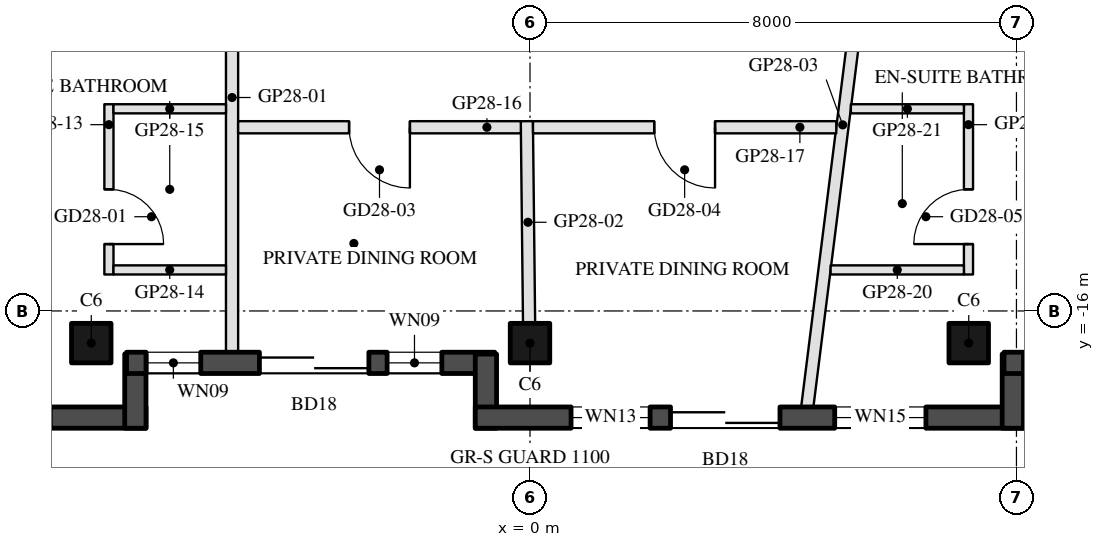
"""IFC4 building model, lengths in metres.
Left out: names, types, materials, properties, quantities, classifications, styles, units other than length and angle.
Written with IfcOpenShell. Run it as: python <this file> out.ifc"""

import sys

from ifc_helpers import new_model, si_unit, direction, frame, frame_2d, origin, origin_2d, place, context, subcontext, project, spatial, rectangle, hollow_rectangle, extrude, boolean, halfspace, element, fill, save


model = new_model("IFC4")
c1 = context("Model", 3, precision=1e-05, world=origin(), true_north=direction((0.0, 1.0)))
c2 = subcontext(c1, "Body", "Model", "MODEL_VIEW")
j1 = project(units=[si_unit("LENGTHUNIT", "METRE"), si_unit("PLANEANGLEUNIT", "RADIAN")], contexts=[c1])
p1 = place(None, origin())
s1 = spatial("IfcSite", under=j1, at=p1, CompositionType="ELEMENT")
p2 = place(p1, origin())
s2 = spatial("IfcBuilding", under=s1, at=p2, CompositionType="ELEMENT")
p3 = place(p2, frame((0.0, 0.0, 283.7)))
s3 = spatial("IfcBuildingStorey", under=s2, at=p3, CompositionType="ELEMENT", Elevation=283.7)
p4 = place(p3, frame((-7.215, -16.529, 0.0), z_axis=(0.0, 0.0, 1.0), x_axis=(-1.0, 0.0, 0.0)))
e1 = element("IfcColumn", 1, at=p4, inside=s3, PredefinedType="COLUMN", context=c2, shape_type="SweptSolid", body=[
    boolean("DIFFERENCE", extrude(hollow_rectangle(XDim=0.65, YDim=0.65, WallThickness=0.03, at=origin_2d()), origin(), (0.0, 0.0, 1.0), 3.7), halfspace(frame((0.0, 0.0, 3.66), z_axis=(0.0, 0.0, 1.0), x_axis=(1.0, 0.0, 0.0)), False)),
])
p5 = place(p3, frame((0.0, -16.529, 0.0), z_axis=(0.0, 0.0, 1.0), x_axis=(-1.0, 0.0, 0.0)))
e2 = element("IfcColumn", 2, at=p5, inside=s3, PredefinedType="COLUMN", context=c2, shape_type="SweptSolid", body=[
    boolean("DIFFERENCE", extrude(hollow_rectangle(XDim=0.65, YDim=0.65, WallThickness=0.03, at=origin_2d()), origin(), (0.0, 0.0, 1.0), 3.7), halfspace(frame((0.0, 0.0, 3.663), z_axis=(0.0, 0.0, 1.0), x_axis=(1.0, 0.0, 0.0)), False)),
])
p6 = place(p3, frame((7.215, -16.529, 0.0), z_axis=(0.0, 0.0, 1.0), x_axis=(-1.0, 0.0, 0.0)))
e3 = element("IfcColumn", 3, at=p6, inside=s3, PredefinedType="COLUMN", context=c2, shape_type="SweptSolid", body=[
    boolean("DIFFERENCE", extrude(hollow_rectangle(XDim=0.65, YDim=0.65, WallThickness=0.03, at=origin_2d()), origin(), (0.0, 0.0, 1.0), 3.7), halfspace(frame((0.0, 0.0, 3.66), z_axis=(0.0, 0.0, 1.0), x_axis=(1.0, 0.0, 0.0)), False)),
])
p7 = place(p3, frame((-17.185, -17.754, 0.0), z_axis=(0.0, 0.0, 1.0), x_axis=(1.0, 0.0, 0.0)))
e4 = element("IfcWall", 4, at=p7, inside=s3, PredefinedType="SOLIDWALL", context=c2, shape_type="SweptSolid", body=[
    extrude(rectangle(XDim=10.87, YDim=0.35, at=frame_2d((5.435, 0.0))), origin(), (0.0, 0.0, 1.0), 3.55),
])
p8 = place(p7, frame((0.381, 0.0, 0.3)))
e5 = element("IfcOpeningElement", 5, at=p8, cuts=e4, PredefinedType="OPENING", context=c2, shape_type="SweptSolid", body=[
    extrude(rectangle(XDim=1.6, YDim=2.65, at=frame_2d((0.8, 1.325))), frame((0.0, 0.185, 0.0), z_axis=(0.0, -1.0, 0.0), x_axis=(1.0, 0.0, 0.0)), (0.0, 0.0, 1.0), 0.37),
])
p9 = place(p7, frame((6.895, 0.0, 0.0)))
e6 = element("IfcOpeningElement", 6, at=p9, cuts=e4, PredefinedType="OPENING", context=c2, shape_type="SweptSolid", body=[
    extrude(rectangle(XDim=2.4, YDim=2.4, at=frame_2d((1.2, 1.2))), frame((0.0, 0.185, 0.0), z_axis=(0.0, -1.0, 0.0), x_axis=(1.0, 0.0, 0.0)), (0.0, 0.0, 1.0), 0.37),
])
p10 = place(p7, frame((3.43, 0.0, 0.3)))
e7 = element("IfcOpeningElement", 7, at=p10, cuts=e4, PredefinedType="OPENING", context=c2, shape_type="SweptSolid", body=[
    extrude(rectangle(XDim=3.1, YDim=2.65, at=frame_2d((1.55, 1.325))), frame((0.0, 0.185, 0.0), z_axis=(0.0, -1.0, 0.0), x_axis=(1.0, 0.0, 0.0)), (0.0, 0.0, 1.0), 0.37),
])
p11 = place(p3, frame((-6.49, -17.929, 0.0), z_axis=(0.0, 0.0, 1.0), x_axis=(0.0, 1.0, 0.0)))
e8 = element("IfcWall", 8, at=p11, inside=s3, PredefinedType="SOLIDWALL", context=c2, shape_type="SweptSolid", body=[
    extrude(rectangle(XDim=1.22, YDim=0.35, at=frame_2d((0.61, 0.0))), origin(), (0.0, 0.0, 1.0), 3.55),
])
p12 = place(p3, frame((-6.635, -16.854, 0.0), z_axis=(0.0, 0.0, 1.0), x_axis=(1.0, 0.0, 0.0)))
e9 = element("IfcWall", 9, at=p12, inside=s3, PredefinedType="SOLIDWALL", context=c2, shape_type="SweptSolid", body=[
    extrude(rectangle(XDim=6.055, YDim=0.35, at=frame_2d((3.028, 0.0))), origin(), (0.0, 0.0, 1.0), 3.55),
])
p13 = place(p12, frame((0.32, 0.0, 0.3)))
e10 = element("IfcOpeningElement", 10, at=p13, cuts=e9, PredefinedType="OPENING", context=c2, shape_type="SweptSolid", body=[
    extrude(rectangle(XDim=0.9, YDim=2.65, at=frame_2d((0.45, 1.325))), frame((0.0, 0.185, 0.0), z_axis=(0.0, -1.0, 0.0), x_axis=(1.0, 0.0, 0.0)), (0.0, 0.0, 1.0), 0.37),
])
p14 = place(p12, frame((2.186, 0.0, 0.0)))
e11 = element("IfcOpeningElement", 11, at=p14, cuts=e9, PredefinedType="OPENING", context=c2, shape_type="SweptSolid", body=[
    extrude(rectangle(XDim=1.8, YDim=2.4, at=frame_2d((0.9, 1.2))), frame((0.0, 0.185, 0.0), z_axis=(0.0, -1.0, 0.0), x_axis=(1.0, 0.0, 0.0)), (0.0, 0.0, 1.0), 0.37),
])
p15 = place(p12, frame((4.285, 0.0, 0.3)))
e12 = element("IfcOpeningElement", 12, at=p15, cuts=e9, PredefinedType="OPENING", context=c2, shape_type="SweptSolid", body=[
    extrude(rectangle(XDim=0.9, YDim=2.65, at=frame_2d((0.45, 1.325))), frame((0.0, 0.185, 0.0), z_axis=(0.0, -1.0, 0.0), x_axis=(1.0, 0.0, 0.0)), (0.0, 0.0, 1.0), 0.37),
])
p16 = place(p3, frame((-0.725, -16.709, 0.0), z_axis=(0.0, 0.0, 1.0), x_axis=(0.0, -1.0, 0.0)))
e13 = element("IfcWall", 13, at=p16, inside=s3, PredefinedType="SOLIDWALL", context=c2, shape_type="SweptSolid", body=[
    extrude(rectangle(XDim=1.22, YDim=0.35, at=frame_2d((0.61, 0.0))), origin(), (0.0, 0.0, 1.0), 3.55),
])
p17 = place(p3, frame((-0.9, -17.754, 0.0), z_axis=(0.0, 0.0, 1.0), x_axis=(1.0, 0.0, 0.0)))
e14 = element("IfcWall", 14, at=p17, inside=s3, PredefinedType="SOLIDWALL", context=c2, shape_type="SweptSolid", body=[
    extrude(rectangle(XDim=9.015, YDim=0.35, at=frame_2d((4.508, 0.0))), origin(), (0.0, 0.0, 1.0), 3.55),
])
p18 = place(p17, frame((3.211, 0.0, 0.0)))
e15 = element("IfcOpeningElement", 15, at=p18, cuts=e14, PredefinedType="OPENING", context=c2, shape_type="SweptSolid", body=[
    extrude(rectangle(XDim=1.8, YDim=2.4, at=frame_2d((0.9, 1.2))), frame((0.0, 0.185, 0.0), z_axis=(0.0, -1.0, 0.0), x_axis=(1.0, 0.0, 0.0)), (0.0, 0.0, 1.0), 0.37),
])
p19 = place(p17, frame((1.575, 0.0, 0.3)))
e16 = element("IfcOpeningElement", 16, at=p19, cuts=e14, PredefinedType="OPENING", context=c2, shape_type="SweptSolid", body=[
    extrude(rectangle(XDim=1.3, YDim=2.65, at=frame_2d((0.65, 1.325))), frame((0.0, 0.185, 0.0), z_axis=(0.0, -1.0, 0.0), x_axis=(1.0, 0.0, 0.0)), (0.0, 0.0, 1.0), 0.37),
])
p20 = place(p17, frame((5.911, 0.0, 0.3)))
e17 = element("IfcOpeningElement", 17, at=p20, cuts=e14, PredefinedType="OPENING", context=c2, shape_type="SweptSolid", body=[
    extrude(rectangle(XDim=1.5, YDim=2.65, at=frame_2d((0.75, 1.325))), frame((0.0, 0.185, 0.0), z_axis=(0.0, -1.0, 0.0), x_axis=(1.0, 0.0, 0.0)), (0.0, 0.0, 1.0), 0.37),
])
p21 = place(p3, frame((7.94, -17.929, 0.0), z_axis=(0.0, 0.0, 1.0), x_axis=(0.0, 1.0, 0.0)))
e18 = element("IfcWall", 18, at=p21, inside=s3, PredefinedType="SOLIDWALL", context=c2, shape_type="SweptSolid", body=[
    extrude(rectangle(XDim=1.22, YDim=0.35, at=frame_2d((0.61, 0.0))), origin(), (0.0, 0.0, 1.0), 3.55),
])
p22 = place(p3, frame((7.795, -16.854, 0.0), z_axis=(0.0, 0.0, 1.0), x_axis=(1.0, 0.0, 0.0)))
e19 = element("IfcWall", 19, at=p22, inside=s3, PredefinedType="SOLIDWALL", context=c2, shape_type="SweptSolid", body=[
    extrude(rectangle(XDim=6.055, YDim=0.35, at=frame_2d((3.028, 0.0))), origin(), (0.0, 0.0, 1.0), 3.55),
])
p23 = place(p22, frame((0.32, 0.0, 0.0)))
e20 = element("IfcOpeningElement", 20, at=p23, cuts=e19, PredefinedType="OPENING", context=c2, shape_type="SweptSolid", body=[
    extrude(rectangle(XDim=2.4, YDim=2.4, at=frame_2d((1.2, 1.2))), frame((0.0, 0.185, 0.0), z_axis=(0.0, -1.0, 0.0), x_axis=(1.0, 0.0, 0.0)), (0.0, 0.0, 1.0), 0.37),
])
p24 = place(p22, frame((3.02, 0.0, 0.3)))
e21 = element("IfcOpeningElement", 21, at=p24, cuts=e19, PredefinedType="OPENING", context=c2, shape_type="SweptSolid", body=[
    extrude(rectangle(XDim=2.2, YDim=2.65, at=frame_2d((1.1, 1.325))), frame((0.0, 0.185, 0.0), z_axis=(0.0, -1.0, 0.0), x_axis=(1.0, 0.0, 0.0)), (0.0, 0.0, 1.0), 0.37),
])
p25 = place(p3, frame((-4.9, -16.679, 0.0), z_axis=(0.0, 0.0, 1.0), x_axis=(0.0, 1.0, 0.0)))
e22 = element("IfcWall", 22, at=p25, inside=s3, PredefinedType="PARTITIONING", context=c2, shape_type="SweptSolid", body=[
    extrude(rectangle(XDim=8.379, YDim=0.2, at=frame_2d((4.189, 0.0))), origin(), (0.0, 0.0, 1.0), 3.1),
])
p26 = place(p3, frame((-0.015, -16.204, 0.0), z_axis=(0.0, 0.0, 1.0), x_axis=(-0.011013356537, 0.99993935115, 0.0)))
e23 = element("IfcWall", 23, at=p26, inside=s3, PredefinedType="PARTITIONING", context=c2, shape_type="SweptSolid", body=[
    extrude(rectangle(XDim=3.325, YDim=0.2, at=frame_2d((1.663, 0.0))), origin(), (0.0, 0.0, 1.0), 3.05),
])
p27 = place(p3, frame((4.56, -17.579, 0.0), z_axis=(0.0, 0.0, 1.0), x_axis=(0.124584174438, 0.992209042228, 0.0)))
e24 = element("IfcWall", 24, at=p27, inside=s3, PredefinedType="PARTITIONING", context=c2, shape_type="SweptSolid", body=[
    extrude(rectangle(XDim=9.351, YDim=0.2, at=frame_2d((4.676, 0.0))), origin(), (0.0, 0.0, 1.0), 3.1),
])
p28 = place(p3, frame((-6.925, -12.6, 0.0), z_axis=(0.0, 0.0, 1.0), x_axis=(0.0, -1.0, 0.0)))
e25 = element("IfcWall", 25, at=p28, inside=s3, PredefinedType="PARTITIONING", context=c2, shape_type="SweptSolid", body=[
    extrude(rectangle(XDim=2.8, YDim=0.15, at=frame_2d((1.4, 0.0))), origin(), (0.0, 0.0, 1.0), 3.55),
])
p29 = place(p28, frame((1.4, 0.0, 0.0)))
e26 = element("IfcOpeningElement", 26, at=p29, cuts=e25, PredefinedType="OPENING", context=c2, shape_type="SweptSolid", body=[
    extrude(rectangle(XDim=0.9, YDim=2.1, at=frame_2d((0.45, 1.05))), frame((0.0, 0.085, 0.0), z_axis=(0.0, -1.0, 0.0), x_axis=(1.0, 0.0, 0.0)), (0.0, 0.0, 1.0), 0.17),
])
for number, where, z_axis, x_axis in (
    (27, (-6.85, -15.325, 0.0), (0.0, 0.0, 1.0), (1.0, 0.0, 0.0)),
    (28, (-6.85, -12.675, 0.0), (0.0, 0.0, 1.0), (1.0, 0.0, 0.0)),
):
    element("IfcWall", number, at=place(p3, frame(where, z_axis=z_axis, x_axis=x_axis)), inside=s3, PredefinedType="PARTITIONING", context=c2, shape_type="SweptSolid", body=[
        extrude(rectangle(XDim=1.85, YDim=0.15, at=frame_2d((0.925, 0.0))), origin(), (0.0, 0.0, 1.0), 3.55),
    ])
p30 = place(p3, frame((-0.151, -12.979, 0.0), z_axis=(0.0, 0.0, 1.0), x_axis=(-1.0, 0.0, 0.0)))
e29 = element("IfcWall", 29, at=p30, inside=s3, PredefinedType="PARTITIONING", context=c2, shape_type="SweptSolid", body=[
    extrude(rectangle(XDim=4.649, YDim=0.2, at=frame_2d((2.325, 0.0))), origin(), (0.0, 0.0, 1.0), 3.05),
])
p31 = place(p30, frame((1.825, 0.0, 0.0)))
e30 = element("IfcOpeningElement", 30, at=p31, cuts=e29, PredefinedType="OPENING", context=c2, shape_type="SweptSolid", body=[
    extrude(rectangle(XDim=1.0, YDim=2.1, at=frame_2d((0.5, 1.05))), frame((0.0, 0.11, 0.0), z_axis=(0.0, -1.0, 0.0), x_axis=(1.0, 0.0, 0.0)), (0.0, 0.0, 1.0), 0.22),
])
p32 = place(p3, frame((5.037, -12.979, 0.0), z_axis=(0.0, 0.0, 1.0), x_axis=(-1.0, 0.0, 0.0)))
e31 = element("IfcWall", 31, at=p32, inside=s3, PredefinedType="PARTITIONING", context=c2, shape_type="SweptSolid", body=[
    extrude(rectangle(XDim=4.988, YDim=0.2, at=frame_2d((2.494, 0.0))), origin(), (0.0, 0.0, 1.0), 3.05),
])
p33 = place(p32, frame((1.994, 0.0, 0.0)))
e32 = element("IfcOpeningElement", 32, at=p33, cuts=e31, PredefinedType="OPENING", context=c2, shape_type="SweptSolid", body=[
    extrude(rectangle(XDim=1.0, YDim=2.1, at=frame_2d((0.5, 1.05))), frame((0.0, 0.11, 0.0), z_axis=(0.0, -1.0, 0.0), x_axis=(1.0, 0.0, 0.0)), (0.0, 0.0, 1.0), 0.22),
])
p34 = place(p3, frame((7.211, -15.4, 0.0), z_axis=(0.0, 0.0, 1.0), x_axis=(0.0, 1.0, 0.0)))
e33 = element("IfcWall", 33, at=p34, inside=s3, PredefinedType="PARTITIONING", context=c2, shape_type="SweptSolid", body=[
    extrude(rectangle(XDim=2.8, YDim=0.15, at=frame_2d((1.4, 0.0))), origin(), (0.0, 0.0, 1.0), 3.05),
])
p35 = place(p34, frame((0.5, 0.0, 0.0)))
e34 = element("IfcOpeningElement", 34, at=p35, cuts=e33, PredefinedType="OPENING", context=c2, shape_type="SweptSolid", body=[
    extrude(rectangle(XDim=0.9, YDim=2.1, at=frame_2d((0.45, 1.05))), frame((0.0, 0.085, 0.0), z_axis=(0.0, -1.0, 0.0), x_axis=(1.0, 0.0, 0.0)), (0.0, 0.0, 1.0), 0.17),
])
p36 = place(p3, frame((4.944, -15.325, 0.0), z_axis=(0.0, 0.0, 1.0), x_axis=(1.0, 0.0, 0.0)))
e35 = element("IfcWall", 35, at=p36, inside=s3, PredefinedType="PARTITIONING", context=c2, shape_type="SweptSolid", body=[
    extrude(rectangle(XDim=2.192, YDim=0.15, at=frame_2d((1.096, 0.0))), origin(), (0.0, 0.0, 1.0), 3.05),
])
p37 = place(p3, frame((5.277, -12.675, 0.0), z_axis=(0.0, 0.0, 1.0), x_axis=(1.0, 0.0, 0.0)))
e36 = element("IfcWall", 36, at=p37, inside=s3, PredefinedType="PARTITIONING", context=c2, shape_type="SweptSolid", body=[
    extrude(rectangle(XDim=1.859, YDim=0.15, at=frame_2d((0.93, 0.0))), origin(), (0.0, 0.0, 1.0), 3.05),
])
p38 = place(p13, origin())
e37 = element("IfcWindow", 37, at=p38, inside=s3, PartitioningType="SINGLE_PANEL", PredefinedType="WINDOW", context=c2, shape_type="SweptSolid", body=[
    extrude(rectangle(XDim=0.9, YDim=2.65, at=frame_2d((0.45, 1.325))), frame((0.0, 0.03, 0.0), z_axis=(0.0, -1.0, 0.0), x_axis=(1.0, 0.0, 0.0)), (0.0, 0.0, 1.0), 0.06),
])
fill(e10, e37)
p39 = place(p14, frame((1.8, 0.0, 0.0), z_axis=(0.0, 0.0, 1.0), x_axis=(-1.0, 0.0, 0.0)))
e38 = element("IfcDoor", 38, at=p39, inside=s3, OperationType="SLIDING_TO_LEFT", PredefinedType="DOOR", context=c2, shape_type="SweptSolid", body=[
    extrude(rectangle(XDim=1.8, YDim=2.4, at=frame_2d((0.9, 1.2))), frame((0.0, 0.025, 0.0), z_axis=(0.0, -1.0, 0.0), x_axis=(1.0, 0.0, 0.0)), (0.0, 0.0, 1.0), 0.05),
])
fill(e11, e38)
p40 = place(p15, origin())
e39 = element("IfcWindow", 39, at=p40, inside=s3, PartitioningType="SINGLE_PANEL", PredefinedType="WINDOW", context=c2, shape_type="SweptSolid", body=[
    extrude(rectangle(XDim=0.9, YDim=2.65, at=frame_2d((0.45, 1.325))), frame((0.0, 0.03, 0.0), z_axis=(0.0, -1.0, 0.0), x_axis=(1.0, 0.0, 0.0)), (0.0, 0.0, 1.0), 0.06),
])
fill(e12, e39)
p41 = place(p18, frame((1.8, 0.0, 0.0), z_axis=(0.0, 0.0, 1.0), x_axis=(-1.0, 0.0, 0.0)))
e40 = element("IfcDoor", 40, at=p41, inside=s3, OperationType="SLIDING_TO_LEFT", PredefinedType="DOOR", context=c2, shape_type="SweptSolid", body=[
    extrude(rectangle(XDim=1.8, YDim=2.4, at=frame_2d((0.9, 1.2))), frame((0.0, 0.025, 0.0), z_axis=(0.0, -1.0, 0.0), x_axis=(1.0, 0.0, 0.0)), (0.0, 0.0, 1.0), 0.05),
])
fill(e15, e40)
p42 = place(p19, origin())
e41 = element("IfcWindow", 41, at=p42, inside=s3, PartitioningType="SINGLE_PANEL", PredefinedType="WINDOW", context=c2, shape_type="SweptSolid", body=[
    extrude(rectangle(XDim=1.3, YDim=2.65, at=frame_2d((0.65, 1.325))), frame((0.0, 0.03, 0.0), z_axis=(0.0, -1.0, 0.0), x_axis=(1.0, 0.0, 0.0)), (0.0, 0.0, 1.0), 0.06),
])
fill(e16, e41)
p43 = place(p20, origin())
e42 = element("IfcWindow", 42, at=p43, inside=s3, PartitioningType="SINGLE_PANEL", PredefinedType="WINDOW", context=c2, shape_type="SweptSolid", body=[
    extrude(rectangle(XDim=1.5, YDim=2.65, at=frame_2d((0.75, 1.325))), frame((0.0, 0.03, 0.0), z_axis=(0.0, -1.0, 0.0), x_axis=(1.0, 0.0, 0.0)), (0.0, 0.0, 1.0), 0.06),
])
fill(e17, e42)
p44 = place(p23, frame((2.4, 0.0, 0.0), z_axis=(0.0, 0.0, 1.0), x_axis=(-1.0, 0.0, 0.0)))
e43 = element("IfcDoor", 43, at=p44, inside=s3, OperationType="SLIDING_TO_LEFT", PredefinedType="DOOR", context=c2, shape_type="SweptSolid", body=[
    extrude(rectangle(XDim=2.4, YDim=2.4, at=frame_2d((1.2, 1.2))), frame((0.0, 0.025, 0.0), z_axis=(0.0, -1.0, 0.0), x_axis=(1.0, 0.0, 0.0)), (0.0, 0.0, 1.0), 0.05),
])
fill(e20, e43)
p45 = place(p29, origin())
e44 = element("IfcDoor", 44, at=p45, inside=s3, OperationType="SINGLE_SWING_RIGHT", PredefinedType="DOOR", context=c2, shape_type="SweptSolid", body=[
    extrude(rectangle(XDim=0.9, YDim=2.1, at=frame_2d((0.45, 1.05))), frame((0.0, 0.025, 0.0), z_axis=(0.0, -1.0, 0.0), x_axis=(1.0, 0.0, 0.0)), (0.0, 0.0, 1.0), 0.05),
])
fill(e26, e44)
p46 = place(p31, origin())
e45 = element("IfcDoor", 45, at=p46, inside=s3, OperationType="SINGLE_SWING_LEFT", PredefinedType="DOOR", context=c2, shape_type="SweptSolid", body=[
    extrude(rectangle(XDim=1.0, YDim=2.1, at=frame_2d((0.5, 1.05))), frame((0.0, 0.025, 0.0), z_axis=(0.0, -1.0, 0.0), x_axis=(1.0, 0.0, 0.0)), (0.0, 0.0, 1.0), 0.05),
])
fill(e30, e45)
p47 = place(p33, origin())
e46 = element("IfcDoor", 46, at=p47, inside=s3, OperationType="SINGLE_SWING_LEFT", PredefinedType="DOOR", context=c2, shape_type="SweptSolid", body=[
    extrude(rectangle(XDim=1.0, YDim=2.1, at=frame_2d((0.5, 1.05))), frame((0.0, 0.025, 0.0), z_axis=(0.0, -1.0, 0.0), x_axis=(1.0, 0.0, 0.0)), (0.0, 0.0, 1.0), 0.05),
])
fill(e32, e46)
p48 = place(p35, origin())
e47 = element("IfcDoor", 47, at=p48, inside=s3, OperationType="SINGLE_SWING_LEFT", PredefinedType="DOOR", context=c2, shape_type="SweptSolid", body=[
    extrude(rectangle(XDim=0.9, YDim=2.1, at=frame_2d((0.45, 1.05))), frame((0.0, 0.025, 0.0), z_axis=(0.0, -1.0, 0.0), x_axis=(1.0, 0.0, 0.0)), (0.0, 0.0, 1.0), 0.05),
])
fill(e34, e47)
save(model, sys.argv[1])
